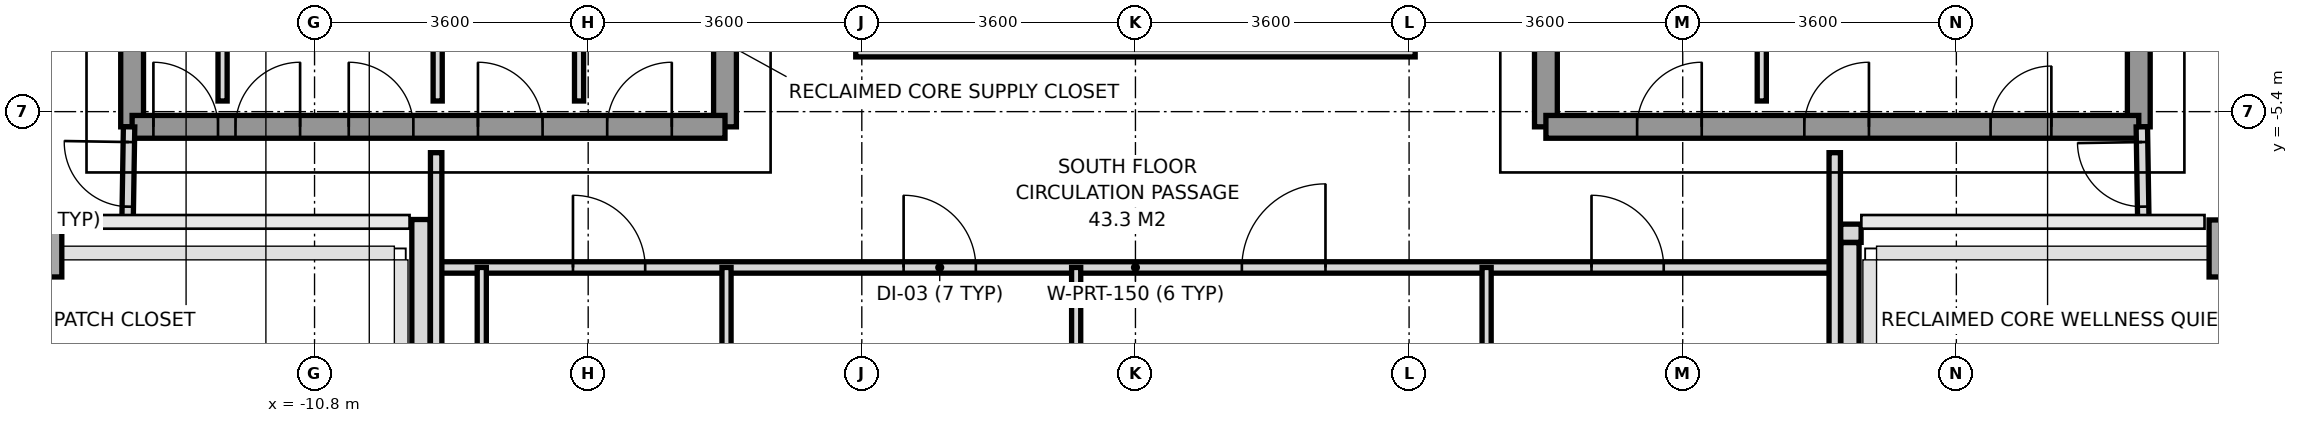
"""IFC4 building model, lengths in metres.
Left out: names, types, materials, properties, quantities, classifications, styles, units other than length and angle.
Written with IfcOpenShell. Run it as: python <this file> out.ifc"""

import sys

from ifc_helpers import new_model, si_unit, direction, frame, frame_2d, origin, origin_2d, place, context, subcontext, project, spatial, rectangle, extrude, source, transform, mapped, element, fill, save


model = new_model("IFC4")
c1 = context("Model", 3, precision=1e-05, world=origin(), true_north=direction((0.0, 1.0)))
c2 = subcontext(c1, "Body", "Model", "MODEL_VIEW")
j1 = project(units=[si_unit("LENGTHUNIT", "METRE"), si_unit("PLANEANGLEUNIT", "RADIAN")], contexts=[c1])
p1 = place(None, origin())
s1 = spatial("IfcSite", under=j1, at=p1, CompositionType="ELEMENT")
p2 = place(p1, origin())
s2 = spatial("IfcBuilding", under=s1, at=p2, CompositionType="ELEMENT")
p3 = place(p2, frame((0.0, 0.0, 230.0)))
s3 = spatial("IfcBuildingStorey", under=s2, at=p3, CompositionType="ELEMENT", Elevation=230.0)
m1 = source(origin(), c2, "Body", "SweptSolid", [
    extrude(rectangle(XDim=0.55, YDim=0.75, at=origin_2d()), origin(), (0.0, 0.0, 1.0), 3.01),
])
for number, where, z_axis, x_axis in (
    (1, (-14.4, -7.2, 0.0), (0.0, 0.0, 1.0), (1.0, 0.0, 0.0)),
    (2, (14.4, -7.2, 0.0), (0.0, 0.0, 1.0), (1.0, 0.0, 0.0)),
):
    element("IfcColumn", number, at=place(p3, frame(where, z_axis=z_axis, x_axis=x_axis)), inside=s3, PredefinedType="COLUMN", context=c2, shape_type="MappedRepresentation", body=[
        mapped(m1, transform((0.0, 0.0, 0.0), x_axis=(1.0, 0.0, 0.0), y_axis=(0.0, 1.0, 0.0), z_axis=(0.0, 0.0, 1.0), scale=1.0)),
    ])
p4 = place(p3, frame((9.547, -7.0, 0.0), z_axis=(0.0, 0.0, 1.0), x_axis=(-1.0, 0.0, 0.0)))
e3 = element("IfcWall", 3, at=p4, inside=s3, PredefinedType="PARAPET", context=c2, shape_type="SweptSolid", body=[
    extrude(rectangle(XDim=0.269, YDim=0.24, at=frame_2d((0.135, 0.0))), origin(), (0.0, 0.0, 1.0), 1.15),
])
p5 = place(p3, frame((9.4, -7.123, 0.0), z_axis=(0.0, 0.0, 1.0), x_axis=(0.0, -1.0, 0.0)))
e4 = element("IfcWall", 4, at=p5, inside=s3, PredefinedType="PARAPET", context=c2, shape_type="SweptSolid", body=[
    extrude(rectangle(XDim=1.499, YDim=0.24, at=frame_2d((0.75, 0.0))), origin(), (0.0, 0.0, 1.0), 1.15),
])
p6 = place(p3, frame((-9.4, -8.622, 0.0), z_axis=(0.0, 0.0, 1.0), x_axis=(0.0, 1.0, 0.0)))
e5 = element("IfcWall", 5, at=p6, inside=s3, PredefinedType="PARAPET", context=c2, shape_type="SweptSolid", body=[
    extrude(rectangle(XDim=1.803, YDim=0.24, at=frame_2d((0.901, 0.0))), origin(), (0.0, 0.0, 1.0), 1.15),
])
p7 = place(p3, frame((-13.2, -5.6, 0.0), z_axis=(0.0, 0.0, 1.0), x_axis=(0.0, 1.0, 0.0)))
e6 = element("IfcWall", 6, at=p7, inside=s3, PredefinedType="SHEAR", context=c2, shape_type="SweptSolid", body=[
    extrude(rectangle(XDim=11.2, YDim=0.3, at=frame_2d((5.6, 0.0))), origin(), (0.0, 0.0, 1.0), 3.01),
])
p8 = place(p3, frame((-5.4, -5.6, 0.0), z_axis=(0.0, 0.0, 1.0), x_axis=(0.0, 1.0, 0.0)))
e7 = element("IfcWall", 7, at=p8, inside=s3, PredefinedType="SHEAR", context=c2, shape_type="SweptSolid", body=[
    extrude(rectangle(XDim=12.5, YDim=0.3, at=frame_2d((6.25, 0.0))), origin(), (0.0, 0.0, 1.0), 3.01),
])
p9 = place(p8, frame((4.55, 0.0, 0.0)))
e8 = element("IfcOpeningElement", 8, at=p9, cuts=e7, PredefinedType="OPENING", context=c2, shape_type="SweptSolid", body=[
    extrude(rectangle(XDim=1.2, YDim=2.2, at=frame_2d((0.6, 1.1))), frame((0.0, 0.16, 0.0), z_axis=(0.0, -1.0, 0.0), x_axis=(1.0, 0.0, 0.0)), (0.0, 0.0, 1.0), 0.32),
])
p10 = place(p8, frame((10.45, 0.0, 0.0)))
e9 = element("IfcOpeningElement", 9, at=p10, cuts=e7, PredefinedType="OPENING", context=c2, shape_type="SweptSolid", body=[
    extrude(rectangle(XDim=1.2, YDim=2.2, at=frame_2d((0.6, 1.1))), frame((0.0, 0.16, 0.0), z_axis=(0.0, -1.0, 0.0), x_axis=(1.0, 0.0, 0.0)), (0.0, 0.0, 1.0), 0.32),
])
p11 = place(p8, frame((6.86, 0.0, 0.0)))
e10 = element("IfcOpeningElement", 10, at=p11, cuts=e7, PredefinedType="OPENING", context=c2, shape_type="SweptSolid", body=[
    extrude(rectangle(XDim=0.8, YDim=2.1, at=frame_2d((0.4, 1.05))), frame((0.0, 0.16, 0.0), z_axis=(0.0, -1.0, 0.0), x_axis=(1.0, 0.0, 0.0)), (0.0, 0.0, 1.0), 0.32),
])
p12 = place(p3, frame((-13.2, -5.6, 0.0), z_axis=(0.0, 0.0, 1.0), x_axis=(1.0, 0.0, 0.0)))
e11 = element("IfcWall", 11, at=p12, inside=s3, PredefinedType="SHEAR", context=c2, shape_type="SweptSolid", body=[
    extrude(rectangle(XDim=7.8, YDim=0.3, at=frame_2d((3.9, 0.0))), origin(), (0.0, 0.0, 1.0), 3.01),
])
p13 = place(p12, frame((0.28, 0.0, 0.0)))
e12 = element("IfcOpeningElement", 12, at=p13, cuts=e11, PredefinedType="OPENING", context=c2, shape_type="SweptSolid", body=[
    extrude(rectangle(XDim=0.85, YDim=2.1, at=frame_2d((0.425, 1.05))), frame((0.0, 0.16, 0.0), z_axis=(0.0, -1.0, 0.0), x_axis=(1.0, 0.0, 0.0)), (0.0, 0.0, 1.0), 0.32),
])
p14 = place(p12, frame((1.36, 0.0, 0.0)))
e13 = element("IfcOpeningElement", 13, at=p14, cuts=e11, PredefinedType="OPENING", context=c2, shape_type="SweptSolid", body=[
    extrude(rectangle(XDim=0.85, YDim=2.1, at=frame_2d((0.425, 1.05))), frame((0.0, 0.16, 0.0), z_axis=(0.0, -1.0, 0.0), x_axis=(1.0, 0.0, 0.0)), (0.0, 0.0, 1.0), 0.32),
])
p15 = place(p12, frame((2.85, 0.0, 0.0)))
e14 = element("IfcOpeningElement", 14, at=p15, cuts=e11, PredefinedType="OPENING", context=c2, shape_type="SweptSolid", body=[
    extrude(rectangle(XDim=0.85, YDim=2.1, at=frame_2d((0.425, 1.05))), frame((0.0, 0.16, 0.0), z_axis=(0.0, -1.0, 0.0), x_axis=(1.0, 0.0, 0.0)), (0.0, 0.0, 1.0), 0.32),
])
p16 = place(p12, frame((4.55, 0.0, 0.0)))
e15 = element("IfcOpeningElement", 15, at=p16, cuts=e11, PredefinedType="OPENING", context=c2, shape_type="SweptSolid", body=[
    extrude(rectangle(XDim=0.85, YDim=2.1, at=frame_2d((0.425, 1.05))), frame((0.0, 0.16, 0.0), z_axis=(0.0, -1.0, 0.0), x_axis=(1.0, 0.0, 0.0)), (0.0, 0.0, 1.0), 0.32),
])
p17 = place(p12, frame((6.25, 0.0, 0.0)))
e16 = element("IfcOpeningElement", 16, at=p17, cuts=e11, PredefinedType="OPENING", context=c2, shape_type="SweptSolid", body=[
    extrude(rectangle(XDim=0.85, YDim=2.1, at=frame_2d((0.425, 1.05))), frame((0.0, 0.16, 0.0), z_axis=(0.0, -1.0, 0.0), x_axis=(1.0, 0.0, 0.0)), (0.0, 0.0, 1.0), 0.32),
])
p18 = place(p3, frame((13.2, -5.6, 0.0), z_axis=(0.0, 0.0, 1.0), x_axis=(0.0, 1.0, 0.0)))
e17 = element("IfcWall", 17, at=p18, inside=s3, PredefinedType="SHEAR", context=c2, shape_type="SweptSolid", body=[
    extrude(rectangle(XDim=11.2, YDim=0.3, at=frame_2d((5.6, 0.0))), origin(), (0.0, 0.0, 1.0), 3.01),
])
p19 = place(p3, frame((5.4, -5.6, 0.0), z_axis=(0.0, 0.0, 1.0), x_axis=(0.0, 1.0, 0.0)))
e18 = element("IfcWall", 18, at=p19, inside=s3, PredefinedType="SHEAR", context=c2, shape_type="SweptSolid", body=[
    extrude(rectangle(XDim=12.5, YDim=0.3, at=frame_2d((6.25, 0.0))), origin(), (0.0, 0.0, 1.0), 3.01),
])
p20 = place(p19, frame((4.55, 0.0, 0.0)))
e19 = element("IfcOpeningElement", 19, at=p20, cuts=e18, PredefinedType="OPENING", context=c2, shape_type="SweptSolid", body=[
    extrude(rectangle(XDim=1.2, YDim=2.2, at=frame_2d((0.6, 1.1))), frame((0.0, 0.16, 0.0), z_axis=(0.0, -1.0, 0.0), x_axis=(1.0, 0.0, 0.0)), (0.0, 0.0, 1.0), 0.32),
])
p21 = place(p19, frame((10.45, 0.0, 0.0)))
e20 = element("IfcOpeningElement", 20, at=p21, cuts=e18, PredefinedType="OPENING", context=c2, shape_type="SweptSolid", body=[
    extrude(rectangle(XDim=1.2, YDim=2.2, at=frame_2d((0.6, 1.1))), frame((0.0, 0.16, 0.0), z_axis=(0.0, -1.0, 0.0), x_axis=(1.0, 0.0, 0.0)), (0.0, 0.0, 1.0), 0.32),
])
p22 = place(p19, frame((6.86, 0.0, 0.0)))
e21 = element("IfcOpeningElement", 21, at=p22, cuts=e18, PredefinedType="OPENING", context=c2, shape_type="SweptSolid", body=[
    extrude(rectangle(XDim=0.8, YDim=2.1, at=frame_2d((0.4, 1.05))), frame((0.0, 0.16, 0.0), z_axis=(0.0, -1.0, 0.0), x_axis=(1.0, 0.0, 0.0)), (0.0, 0.0, 1.0), 0.32),
])
p23 = place(p19, frame((7.88, 0.0, 0.0)))
e22 = element("IfcOpeningElement", 22, at=p23, cuts=e18, PredefinedType="OPENING", context=c2, shape_type="SweptSolid", body=[
    extrude(rectangle(XDim=0.8, YDim=2.1, at=frame_2d((0.4, 1.05))), frame((0.0, 0.16, 0.0), z_axis=(0.0, -1.0, 0.0), x_axis=(1.0, 0.0, 0.0)), (0.0, 0.0, 1.0), 0.32),
])
p24 = place(p3, frame((5.4, -5.6, 0.0), z_axis=(0.0, 0.0, 1.0), x_axis=(1.0, 0.0, 0.0)))
e23 = element("IfcWall", 23, at=p24, inside=s3, PredefinedType="SHEAR", context=c2, shape_type="SweptSolid", body=[
    extrude(rectangle(XDim=7.8, YDim=0.3, at=frame_2d((3.9, 0.0))), origin(), (0.0, 0.0, 1.0), 3.01),
])
p25 = place(p24, frame((5.85, 0.0, 0.0)))
e24 = element("IfcOpeningElement", 24, at=p25, cuts=e23, PredefinedType="OPENING", context=c2, shape_type="SweptSolid", body=[
    extrude(rectangle(XDim=0.8, YDim=2.1, at=frame_2d((0.4, 1.05))), frame((0.0, 0.16, 0.0), z_axis=(0.0, -1.0, 0.0), x_axis=(1.0, 0.0, 0.0)), (0.0, 0.0, 1.0), 0.32),
])
p26 = place(p24, frame((1.2, 0.0, 0.0)))
e25 = element("IfcOpeningElement", 25, at=p26, cuts=e23, PredefinedType="OPENING", context=c2, shape_type="SweptSolid", body=[
    extrude(rectangle(XDim=0.85, YDim=2.1, at=frame_2d((0.425, 1.05))), frame((0.0, 0.16, 0.0), z_axis=(0.0, -1.0, 0.0), x_axis=(1.0, 0.0, 0.0)), (0.0, 0.0, 1.0), 0.32),
])
p27 = place(p24, frame((3.4, 0.0, 0.0)))
e26 = element("IfcOpeningElement", 26, at=p27, cuts=e23, PredefinedType="OPENING", context=c2, shape_type="SweptSolid", body=[
    extrude(rectangle(XDim=0.85, YDim=2.1, at=frame_2d((0.425, 1.05))), frame((0.0, 0.16, 0.0), z_axis=(0.0, -1.0, 0.0), x_axis=(1.0, 0.0, 0.0)), (0.0, 0.0, 1.0), 0.32),
])
for number, where, z_axis, x_axis in (
    (27, (-12.01, -5.26, 0.0), (0.0, 0.0, 1.0), (0.0, 1.0, 0.0)),
    (28, (-9.18, -5.26, 0.0), (0.0, 0.0, 1.0), (0.0, 1.0, 0.0)),
    (29, (-7.32, -5.26, 0.0), (0.0, 0.0, 1.0), (0.0, 1.0, 0.0)),
    (30, (8.24, -5.26, 0.0), (0.0, 0.0, 1.0), (0.0, 1.0, 0.0)),
):
    element("IfcWall", number, at=place(p3, frame(where, z_axis=z_axis, x_axis=x_axis)), inside=s3, PredefinedType="PARTITIONING", context=c2, shape_type="SweptSolid", body=[
        extrude(rectangle(XDim=2.94, YDim=0.12, at=frame_2d((1.47, 0.0))), origin(), (0.0, 0.0, 1.0), 3.01),
    ])
p28 = place(p3, frame((-9.2, -7.45, 0.0), z_axis=(0.0, 0.0, 1.0), x_axis=(1.0, 0.0, 0.0)))
e31 = element("IfcWall", 31, at=p28, inside=s3, PredefinedType="PARTITIONING", context=c2, shape_type="SweptSolid", body=[
    extrude(rectangle(XDim=18.4, YDim=0.15, at=frame_2d((9.2, 0.0))), origin(), (0.0, 0.0, 1.0), 2.57),
])
p29 = place(p28, frame((1.8, 0.0, 0.0)))
e32 = element("IfcOpeningElement", 32, at=p29, cuts=e31, PredefinedType="OPENING", context=c2, shape_type="SweptSolid", body=[
    extrude(rectangle(XDim=0.95, YDim=2.15, at=frame_2d((0.475, 1.075))), frame((0.0, 0.085, 0.0), z_axis=(0.0, -1.0, 0.0), x_axis=(1.0, 0.0, 0.0)), (0.0, 0.0, 1.0), 0.17),
])
p30 = place(p28, frame((6.15, 0.0, 0.0)))
e33 = element("IfcOpeningElement", 33, at=p30, cuts=e31, PredefinedType="OPENING", context=c2, shape_type="SweptSolid", body=[
    extrude(rectangle(XDim=0.95, YDim=2.15, at=frame_2d((0.475, 1.075))), frame((0.0, 0.085, 0.0), z_axis=(0.0, -1.0, 0.0), x_axis=(1.0, 0.0, 0.0)), (0.0, 0.0, 1.0), 0.17),
])
p31 = place(p28, frame((10.6, 0.0, 0.0)))
e34 = element("IfcOpeningElement", 34, at=p31, cuts=e31, PredefinedType="OPENING", context=c2, shape_type="SweptSolid", body=[
    extrude(rectangle(XDim=1.1, YDim=2.2, at=frame_2d((0.55, 1.1))), frame((0.0, 0.085, 0.0), z_axis=(0.0, -1.0, 0.0), x_axis=(1.0, 0.0, 0.0)), (0.0, 0.0, 1.0), 0.17),
])
p32 = place(p28, frame((15.2, 0.0, 0.0)))
e35 = element("IfcOpeningElement", 35, at=p32, cuts=e31, PredefinedType="OPENING", context=c2, shape_type="SweptSolid", body=[
    extrude(rectangle(XDim=0.95, YDim=2.15, at=frame_2d((0.475, 1.075))), frame((0.0, 0.085, 0.0), z_axis=(0.0, -1.0, 0.0), x_axis=(1.0, 0.0, 0.0)), (0.0, 0.0, 1.0), 0.17),
])
for number, where, z_axis, x_axis in (
    (36, (-9.2, -10.28, 0.0), (0.0, 0.0, 1.0), (0.0, 1.0, 0.0)),
    (37, (9.2, -10.28, 0.0), (0.0, 0.0, 1.0), (0.0, 1.0, 0.0)),
):
    element("IfcWall", number, at=place(p3, frame(where, z_axis=z_axis, x_axis=x_axis)), inside=s3, PredefinedType="PARTITIONING", context=c2, shape_type="SweptSolid", body=[
        extrude(rectangle(XDim=4.34, YDim=0.15, at=frame_2d((2.17, 0.0))), origin(), (0.0, 0.0, 1.0), 2.61),
    ])
p33 = place(p3, frame((-5.38, -19.25, 0.0), z_axis=(0.0, 0.0, 1.0), x_axis=(0.0, 1.0, 0.0)))
e38 = element("IfcWall", 38, at=p33, inside=s3, PredefinedType="PARTITIONING", context=c2, shape_type="SweptSolid", body=[
    extrude(rectangle(XDim=11.8, YDim=0.12, at=frame_2d((5.9, 0.0))), origin(), (0.0, 0.0, 1.0), 2.61),
])
p34 = place(p33, frame((3.2, 0.0, 0.0)))
e39 = element("IfcOpeningElement", 39, at=p34, cuts=e38, PredefinedType="OPENING", context=c2, shape_type="SweptSolid", body=[
    extrude(rectangle(XDim=0.95, YDim=2.15, at=frame_2d((0.475, 1.075))), frame((0.0, 0.07, 0.0), z_axis=(0.0, -1.0, 0.0), x_axis=(1.0, 0.0, 0.0)), (0.0, 0.0, 1.0), 0.14),
])
for number, where, z_axis, x_axis in (
    (40, (-0.78, -19.25, 0.0), (0.0, 0.0, 1.0), (0.0, 1.0, 0.0)),
    (41, (4.62, -19.25, 0.0), (0.0, 0.0, 1.0), (0.0, 1.0, 0.0)),
):
    element("IfcWall", number, at=place(p3, frame(where, z_axis=z_axis, x_axis=x_axis)), inside=s3, PredefinedType="PARTITIONING", context=c2, shape_type="SweptSolid", body=[
        extrude(rectangle(XDim=11.8, YDim=0.12, at=frame_2d((5.9, 0.0))), origin(), (0.0, 0.0, 1.0), 2.61),
    ])
p35 = place(p3, frame((-8.6, -11.05, 0.0), z_axis=(0.0, 0.0, 1.0), x_axis=(0.0, 1.0, 0.0)))
e42 = element("IfcWall", 42, at=p35, inside=s3, PredefinedType="PARTITIONING", context=c2, shape_type="SweptSolid", body=[
    extrude(rectangle(XDim=3.6, YDim=0.12, at=frame_2d((1.8, 0.0))), origin(), (0.0, 0.0, 1.0), 2.61),
])
p36 = place(p3, frame((-13.26, -6.85, 0.0), z_axis=(0.0, 0.0, 1.0), x_axis=(0.016013571389, 0.999871774545, 0.0)))
e43 = element("IfcWall", 43, at=p36, inside=s3, PredefinedType="PARTITIONING", context=c2, shape_type="SweptSolid", body=[
    extrude(rectangle(XDim=1.25, YDim=0.15, at=frame_2d((0.625, 0.0))), origin(), (0.0, 0.0, 1.0), 3.01),
])
p37 = place(p36, frame((0.2, 0.0, 0.0)))
e44 = element("IfcOpeningElement", 44, at=p37, cuts=e43, PredefinedType="OPENING", context=c2, shape_type="SweptSolid", body=[
    extrude(rectangle(XDim=0.85, YDim=2.1, at=frame_2d((0.425, 1.05))), frame((0.0, 0.085, 0.0), z_axis=(0.0, -1.0, 0.0), x_axis=(1.0, 0.0, 0.0)), (0.0, 0.0, 1.0), 0.17),
])
p38 = place(p3, frame((13.26, -6.85, 0.0), z_axis=(0.0, 0.0, 1.0), x_axis=(-0.016013571389, 0.999871774545, 0.0)))
e45 = element("IfcWall", 45, at=p38, inside=s3, PredefinedType="PARTITIONING", context=c2, shape_type="SweptSolid", body=[
    extrude(rectangle(XDim=1.25, YDim=0.15, at=frame_2d((0.625, 0.0))), origin(), (0.0, 0.0, 1.0), 3.01),
])
p39 = place(p38, frame((0.2, 0.0, 0.0)))
e46 = element("IfcOpeningElement", 46, at=p39, cuts=e45, PredefinedType="OPENING", context=c2, shape_type="SweptSolid", body=[
    extrude(rectangle(XDim=0.85, YDim=2.1, at=frame_2d((0.425, 1.05))), frame((0.0, 0.085, 0.0), z_axis=(0.0, -1.0, 0.0), x_axis=(1.0, 0.0, 0.0)), (0.0, 0.0, 1.0), 0.17),
])
p40 = place(p3, frame((-3.68, -4.56, 0.0), z_axis=(0.0, 0.0, 1.0), x_axis=(1.0, 0.0, 0.0)))
e47 = element("IfcWall", 47, at=p40, inside=s3, PredefinedType="PARAPET", context=c2, shape_type="SweptSolid", body=[
    extrude(rectangle(XDim=7.36, YDim=0.24, at=frame_2d((3.68, 0.0))), origin(), (0.0, 0.0, 1.0), 1.15),
])
m2 = source(origin(), c2, "Body", "SweptSolid", [
    extrude(rectangle(XDim=0.85, YDim=2.1, at=frame_2d((0.425, 1.05))), frame((0.0, 0.025, 0.0), z_axis=(0.0, -1.0, 0.0), x_axis=(1.0, 0.0, 0.0)), (0.0, 0.0, 1.0), 0.05),
])
p41 = place(p13, origin())
e48 = element("IfcDoor", 48, at=p41, inside=s3, OperationType="SINGLE_SWING_LEFT", PredefinedType="DOOR", context=c2, shape_type="MappedRepresentation", body=[
    mapped(m2, transform((0.0, 0.0, 0.0), x_axis=(1.0, 0.0, 0.0), y_axis=(0.0, 1.0, 0.0), z_axis=(0.0, 0.0, 1.0), scale=1.0)),
])
fill(e12, e48)
p42 = place(p14, origin())
e49 = element("IfcDoor", 49, at=p42, inside=s3, OperationType="SINGLE_SWING_RIGHT", PredefinedType="DOOR", context=c2, shape_type="MappedRepresentation", body=[
    mapped(m2, transform((0.0, 0.0, 0.0), x_axis=(1.0, 0.0, 0.0), y_axis=(0.0, 1.0, 0.0), z_axis=(0.0, 0.0, 1.0), scale=1.0)),
])
fill(e13, e49)
m3 = source(origin(), c2, "Body", "SweptSolid", [
    extrude(rectangle(XDim=0.8, YDim=2.1, at=frame_2d((0.4, 1.05))), frame((0.0, 0.025, 0.0), z_axis=(0.0, -1.0, 0.0), x_axis=(1.0, 0.0, 0.0)), (0.0, 0.0, 1.0), 0.05),
])
p43 = place(p25, origin())
e50 = element("IfcDoor", 50, at=p43, inside=s3, OperationType="SINGLE_SWING_RIGHT", PredefinedType="DOOR", context=c2, shape_type="MappedRepresentation", body=[
    mapped(m3, transform((0.0, 0.0, 0.0), x_axis=(1.0, 0.0, 0.0), y_axis=(0.0, 1.0, 0.0), z_axis=(0.0, 0.0, 1.0), scale=1.0)),
])
fill(e24, e50)
p44 = place(p15, origin())
e51 = element("IfcDoor", 51, at=p44, inside=s3, OperationType="SINGLE_SWING_LEFT", PredefinedType="DOOR", context=c2, shape_type="MappedRepresentation", body=[
    mapped(m2, transform((0.0, 0.0, 0.0), x_axis=(1.0, 0.0, 0.0), y_axis=(0.0, 1.0, 0.0), z_axis=(0.0, 0.0, 1.0), scale=1.0)),
])
fill(e14, e51)
p45 = place(p16, origin())
e52 = element("IfcDoor", 52, at=p45, inside=s3, OperationType="SINGLE_SWING_LEFT", PredefinedType="DOOR", context=c2, shape_type="MappedRepresentation", body=[
    mapped(m2, transform((0.0, 0.0, 0.0), x_axis=(1.0, 0.0, 0.0), y_axis=(0.0, 1.0, 0.0), z_axis=(0.0, 0.0, 1.0), scale=1.0)),
])
fill(e15, e52)
p46 = place(p17, origin())
e53 = element("IfcDoor", 53, at=p46, inside=s3, OperationType="SINGLE_SWING_RIGHT", PredefinedType="DOOR", context=c2, shape_type="MappedRepresentation", body=[
    mapped(m2, transform((0.0, 0.0, 0.0), x_axis=(1.0, 0.0, 0.0), y_axis=(0.0, 1.0, 0.0), z_axis=(0.0, 0.0, 1.0), scale=1.0)),
])
fill(e16, e53)
p47 = place(p26, origin())
e54 = element("IfcDoor", 54, at=p47, inside=s3, OperationType="SINGLE_SWING_RIGHT", PredefinedType="DOOR", context=c2, shape_type="MappedRepresentation", body=[
    mapped(m2, transform((0.0, 0.0, 0.0), x_axis=(1.0, 0.0, 0.0), y_axis=(0.0, 1.0, 0.0), z_axis=(0.0, 0.0, 1.0), scale=1.0)),
])
fill(e25, e54)
p48 = place(p27, origin())
e55 = element("IfcDoor", 55, at=p48, inside=s3, OperationType="SINGLE_SWING_RIGHT", PredefinedType="DOOR", context=c2, shape_type="MappedRepresentation", body=[
    mapped(m2, transform((0.0, 0.0, 0.0), x_axis=(1.0, 0.0, 0.0), y_axis=(0.0, 1.0, 0.0), z_axis=(0.0, 0.0, 1.0), scale=1.0)),
])
fill(e26, e55)
m4 = source(origin(), c2, "Body", "SweptSolid", [
    extrude(rectangle(XDim=0.95, YDim=2.15, at=frame_2d((0.475, 1.075))), frame((0.0, 0.025, 0.0), z_axis=(0.0, -1.0, 0.0), x_axis=(1.0, 0.0, 0.0)), (0.0, 0.0, 1.0), 0.05),
])
p49 = place(p29, origin())
e56 = element("IfcDoor", 56, at=p49, inside=s3, OperationType="SINGLE_SWING_LEFT", PredefinedType="DOOR", context=c2, shape_type="MappedRepresentation", body=[
    mapped(m4, transform((0.0, 0.0, 0.0), x_axis=(1.0, 0.0, 0.0), y_axis=(0.0, 1.0, 0.0), z_axis=(0.0, 0.0, 1.0), scale=1.0)),
])
fill(e32, e56)
p50 = place(p30, origin())
e57 = element("IfcDoor", 57, at=p50, inside=s3, OperationType="SINGLE_SWING_LEFT", PredefinedType="DOOR", context=c2, shape_type="MappedRepresentation", body=[
    mapped(m4, transform((0.0, 0.0, 0.0), x_axis=(1.0, 0.0, 0.0), y_axis=(0.0, 1.0, 0.0), z_axis=(0.0, 0.0, 1.0), scale=1.0)),
])
fill(e33, e57)
m5 = source(origin(), c2, "Body", "SweptSolid", [
    extrude(rectangle(XDim=1.1, YDim=2.2, at=frame_2d((0.55, 1.1))), frame((0.0, 0.025, 0.0), z_axis=(0.0, -1.0, 0.0), x_axis=(1.0, 0.0, 0.0)), (0.0, 0.0, 1.0), 0.05),
])
p51 = place(p31, origin())
e58 = element("IfcDoor", 58, at=p51, inside=s3, OperationType="SINGLE_SWING_RIGHT", PredefinedType="DOOR", context=c2, shape_type="MappedRepresentation", body=[
    mapped(m5, transform((0.0, 0.0, 0.0), x_axis=(1.0, 0.0, 0.0), y_axis=(0.0, 1.0, 0.0), z_axis=(0.0, 0.0, 1.0), scale=1.0)),
])
fill(e34, e58)
p52 = place(p32, origin())
e59 = element("IfcDoor", 59, at=p52, inside=s3, OperationType="SINGLE_SWING_LEFT", PredefinedType="DOOR", context=c2, shape_type="MappedRepresentation", body=[
    mapped(m4, transform((0.0, 0.0, 0.0), x_axis=(1.0, 0.0, 0.0), y_axis=(0.0, 1.0, 0.0), z_axis=(0.0, 0.0, 1.0), scale=1.0)),
])
fill(e35, e59)
p53 = place(p37, origin())
e60 = element("IfcDoor", 60, at=p53, inside=s3, OperationType="SINGLE_SWING_RIGHT", PredefinedType="DOOR", context=c2, shape_type="MappedRepresentation", body=[
    mapped(m2, transform((0.0, 0.0, 0.0), x_axis=(1.0, 0.0, 0.0), y_axis=(0.0, 1.0, 0.0), z_axis=(0.0, 0.0, 1.0), scale=1.0)),
])
fill(e44, e60)
p54 = place(p39, origin())
e61 = element("IfcDoor", 61, at=p54, inside=s3, OperationType="SINGLE_SWING_RIGHT", PredefinedType="DOOR", context=c2, shape_type="MappedRepresentation", body=[
    mapped(m2, transform((0.0, 0.0, 0.0), x_axis=(1.0, 0.0, 0.0), y_axis=(0.0, 1.0, 0.0), z_axis=(0.0, 0.0, 1.0), scale=1.0)),
])
fill(e46, e61)
save(model, sys.argv[1])
